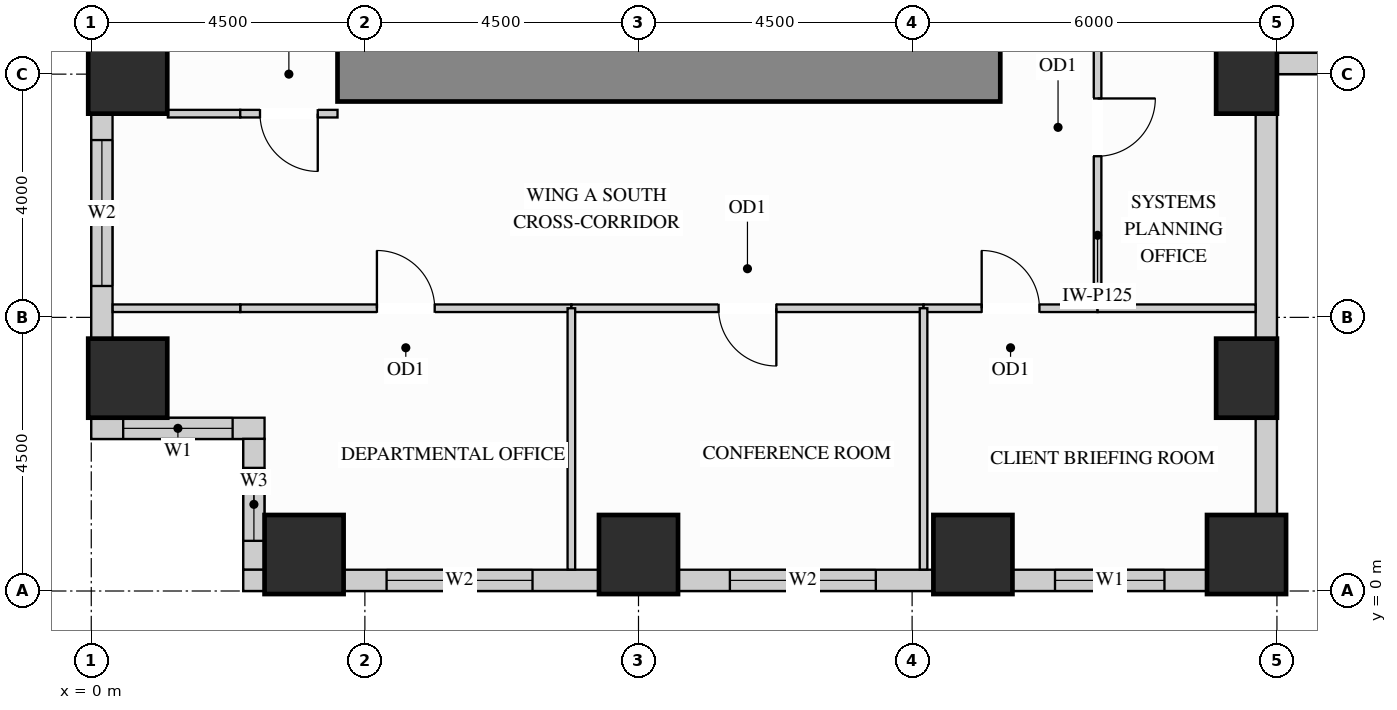
"""IFC4 building model, lengths in metres.
Left out: names, types, materials, properties, quantities, classifications, styles, units other than length and angle.
Written with IfcOpenShell. Run it as: python <this file> out.ifc"""

import sys

from ifc_helpers import new_model, si_unit, direction, frame, frame_2d, origin, origin_2d, place, context, subcontext, project, spatial, rectangle, extrude, source, transform, mapped, element, fill, save


model = new_model("IFC4")
c1 = context("Model", 3, precision=1e-05, world=origin(), true_north=direction((0.0, 1.0)))
c2 = subcontext(c1, "Body", "Model", "MODEL_VIEW")
j1 = project(units=[si_unit("LENGTHUNIT", "METRE"), si_unit("PLANEANGLEUNIT", "RADIAN")], contexts=[c1])
p1 = place(None, origin())
s1 = spatial("IfcSite", under=j1, at=p1, CompositionType="ELEMENT")
p2 = place(p1, origin())
s2 = spatial("IfcBuilding", under=s1, at=p2, CompositionType="ELEMENT")
p3 = place(p2, frame((0.0, 0.0, 65.7)))
s3 = spatial("IfcBuildingStorey", under=s2, at=p3, CompositionType="ELEMENT", Elevation=65.7)
m1 = source(origin(), c2, "Body", "SweptSolid", [
    extrude(rectangle(XDim=1.0, YDim=1.3, at=origin_2d()), origin(), (0.0, 0.0, 1.0), 3.38),
])
for number, where, z_axis, x_axis in (
    (1, (19.0, 3.5, 0.0), (0.0, 0.0, 1.0), (1.0, 0.0, 0.0)),
    (2, (19.0, 8.5, 0.0), (0.0, 0.0, 1.0), (1.0, 0.0, 0.0)),
):
    element("IfcColumn", number, at=place(p3, frame(where, z_axis=z_axis, x_axis=x_axis)), inside=s3, PredefinedType="COLUMN", context=c2, shape_type="MappedRepresentation", body=[
        mapped(m1, transform((0.0, 0.0, 0.0), x_axis=(1.0, 0.0, 0.0), y_axis=(0.0, 1.0, 0.0), z_axis=(0.0, 0.0, 1.0))),
    ])
m2 = source(origin(), c2, "Body", "SweptSolid", [
    extrude(rectangle(XDim=1.3, YDim=1.3, at=origin_2d()), origin(), (0.0, 0.0, 1.0), 3.38),
])
for number, where, z_axis, x_axis in (
    (3, (14.5, 0.6, 0.0), (0.0, 0.0, 1.0), (1.0, 0.0, 0.0)),
    (4, (19.0, 0.6, 0.0), (0.0, 0.0, 1.0), (1.0, 0.0, 0.0)),
    (5, (3.5, 0.6, 0.0), (0.0, 0.0, 1.0), (1.0, 0.0, 0.0)),
    (6, (9.0, 0.6, 0.0), (0.0, 0.0, 1.0), (1.0, 0.0, 0.0)),
    (7, (0.6, 3.5, 0.0), (0.0, 0.0, 1.0), (1.0, 0.0, 0.0)),
    (8, (0.6, 8.5, 0.0), (0.0, 0.0, 1.0), (1.0, 0.0, 0.0)),
):
    element("IfcColumn", number, at=place(p3, frame(where, z_axis=z_axis, x_axis=x_axis)), inside=s3, PredefinedType="COLUMN", context=c2, shape_type="MappedRepresentation", body=[
        mapped(m2, transform((0.0, 0.0, 0.0), x_axis=(1.0, 0.0, 0.0), y_axis=(0.0, 1.0, 0.0), z_axis=(0.0, 0.0, 1.0))),
    ])
m3 = source(origin(), c2, "Body", "SweptSolid", [
    extrude(rectangle(XDim=10.9, YDim=0.9, at=frame_2d((5.45, 0.0))), origin(), (0.0, 0.0, 1.0), 3.38),
])
p4 = place(p3, frame((4.05, 8.5, 0.0), z_axis=(0.0, 0.0, 1.0), x_axis=(1.0, 0.0, 0.0)))
e9 = element("IfcWall", 9, at=p4, inside=s3, PredefinedType="SHEAR", context=c2, shape_type="MappedRepresentation", body=[
    mapped(m3, transform((0.0, 0.0, 0.0), x_axis=(1.0, 0.0, 0.0), y_axis=(0.0, 1.0, 0.0), z_axis=(0.0, 0.0, 1.0))),
])
p5 = place(p3, frame((0.175, 7.852, 0.0), z_axis=(0.0, 0.0, 1.0), x_axis=(0.0, -1.0, 0.0)))
e10 = element("IfcWall", 10, at=p5, inside=s3, PredefinedType="SOLIDWALL", context=c2, shape_type="SweptSolid", body=[
    extrude(rectangle(XDim=3.704, YDim=0.35, at=frame_2d((1.852, 0.0))), origin(), (0.0, 0.0, 1.0), 2.51),
])
p6 = place(p5, frame((0.436, 0.0, 0.78)))
e11 = element("IfcOpeningElement", 11, at=p6, cuts=e10, PredefinedType="OPENING", context=c2, shape_type="SweptSolid", body=[
    extrude(rectangle(XDim=2.4, YDim=1.55, at=frame_2d((1.2, 0.775))), frame((0.0, 0.185, 0.0), z_axis=(0.0, -1.0, 0.0), x_axis=(1.0, 0.0, 0.0)), (0.0, 0.0, 1.0), 0.37),
])
p7 = place(p3, frame((0.0, 2.675, 0.0), z_axis=(0.0, 0.0, 1.0), x_axis=(1.0, 0.0, 0.0)))
e12 = element("IfcWall", 12, at=p7, inside=s3, PredefinedType="SOLIDWALL", context=c2, shape_type="SweptSolid", body=[
    extrude(rectangle(XDim=2.85, YDim=0.35, at=frame_2d((1.425, 0.0))), origin(), (0.0, 0.0, 1.0), 3.365),
])
p8 = place(p7, frame((0.525, 0.0, 0.78)))
e13 = element("IfcOpeningElement", 13, at=p8, cuts=e12, PredefinedType="OPENING", context=c2, shape_type="SweptSolid", body=[
    extrude(rectangle(XDim=1.8, YDim=2.1, at=frame_2d((0.9, 1.05))), frame((0.0, 0.185, 0.0), z_axis=(0.0, -1.0, 0.0), x_axis=(1.0, 0.0, 0.0)), (0.0, 0.0, 1.0), 0.37),
])
p9 = place(p3, frame((2.675, 2.502, 0.0), z_axis=(0.0, 0.0, 1.0), x_axis=(0.0, -1.0, 0.0)))
e14 = element("IfcWall", 14, at=p9, inside=s3, PredefinedType="SOLIDWALL", context=c2, shape_type="SweptSolid", body=[
    extrude(rectangle(XDim=2.154, YDim=0.35, at=frame_2d((1.077, 0.0))), origin(), (0.0, 0.0, 1.0), 3.365),
])
p10 = place(p9, frame((0.477, 0.0, 0.78)))
e15 = element("IfcOpeningElement", 15, at=p10, cuts=e14, PredefinedType="OPENING", context=c2, shape_type="SweptSolid", body=[
    extrude(rectangle(XDim=1.2, YDim=2.1, at=frame_2d((0.6, 1.05))), frame((0.0, 0.185, 0.0), z_axis=(0.0, -1.0, 0.0), x_axis=(1.0, 0.0, 0.0)), (0.0, 0.0, 1.0), 0.37),
])
m4 = source(origin(), c2, "Body", "SweptSolid", [
    extrude(rectangle(XDim=0.352, YDim=0.35, at=frame_2d((0.176, 0.0))), origin(), (0.0, 0.0, 1.0), 3.365),
])
p11 = place(p3, frame((2.5, 0.175, 0.0), z_axis=(0.0, 0.0, 1.0), x_axis=(1.0, 0.0, 0.0)))
e16 = element("IfcWall", 16, at=p11, inside=s3, PredefinedType="SOLIDWALL", context=c2, shape_type="MappedRepresentation", body=[
    mapped(m4, transform((0.0, 0.0, 0.0), x_axis=(1.0, 0.0, 0.0), y_axis=(0.0, 1.0, 0.0), z_axis=(0.0, 0.0, 1.0))),
])
p12 = place(p3, frame((4.148, 0.175, 0.0), z_axis=(0.0, 0.0, 1.0), x_axis=(1.0, 0.0, 0.0)))
e17 = element("IfcWall", 17, at=p12, inside=s3, PredefinedType="SOLIDWALL", context=c2, shape_type="SweptSolid", body=[
    extrude(rectangle(XDim=4.204, YDim=0.35, at=frame_2d((2.102, 0.0))), origin(), (0.0, 0.0, 1.0), 2.51),
])
p13 = place(p12, frame((0.709, 0.0, 0.78)))
e18 = element("IfcOpeningElement", 18, at=p13, cuts=e17, PredefinedType="OPENING", context=c2, shape_type="SweptSolid", body=[
    extrude(rectangle(XDim=2.4, YDim=1.55, at=frame_2d((1.2, 0.775))), frame((0.0, 0.185, 0.0), z_axis=(0.0, -1.0, 0.0), x_axis=(1.0, 0.0, 0.0)), (0.0, 0.0, 1.0), 0.37),
])
p14 = place(p3, frame((9.648, 0.175, 0.0), z_axis=(0.0, 0.0, 1.0), x_axis=(1.0, 0.0, 0.0)))
e19 = element("IfcWall", 19, at=p14, inside=s3, PredefinedType="SOLIDWALL", context=c2, shape_type="SweptSolid", body=[
    extrude(rectangle(XDim=4.204, YDim=0.35, at=frame_2d((2.102, 0.0))), origin(), (0.0, 0.0, 1.0), 2.51),
])
p15 = place(p14, frame((0.855, 0.0, 0.78)))
e20 = element("IfcOpeningElement", 20, at=p15, cuts=e19, PredefinedType="OPENING", context=c2, shape_type="SweptSolid", body=[
    extrude(rectangle(XDim=2.4, YDim=1.55, at=frame_2d((1.2, 0.775))), frame((0.0, 0.185, 0.0), z_axis=(0.0, -1.0, 0.0), x_axis=(1.0, 0.0, 0.0)), (0.0, 0.0, 1.0), 0.37),
])
p16 = place(p3, frame((15.148, 0.175, 0.0), z_axis=(0.0, 0.0, 1.0), x_axis=(1.0, 0.0, 0.0)))
e21 = element("IfcWall", 21, at=p16, inside=s3, PredefinedType="SOLIDWALL", context=c2, shape_type="SweptSolid", body=[
    extrude(rectangle(XDim=3.204, YDim=0.35, at=frame_2d((1.602, 0.0))), origin(), (0.0, 0.0, 1.0), 2.51),
])
p17 = place(p16, frame((0.702, 0.0, 0.78)))
e22 = element("IfcOpeningElement", 22, at=p17, cuts=e21, PredefinedType="OPENING", context=c2, shape_type="SweptSolid", body=[
    extrude(rectangle(XDim=1.8, YDim=1.55, at=frame_2d((0.9, 0.775))), frame((0.0, 0.185, 0.0), z_axis=(0.0, -1.0, 0.0), x_axis=(1.0, 0.0, 0.0)), (0.0, 0.0, 1.0), 0.37),
])
m5 = source(origin(), c2, "Body", "SweptSolid", [
    extrude(rectangle(XDim=1.604, YDim=0.35, at=frame_2d((0.802, 0.0))), origin(), (0.0, 0.0, 1.0), 2.51),
])
p18 = place(p3, frame((19.325, 1.248, 0.0), z_axis=(0.0, 0.0, 1.0), x_axis=(0.0, 1.0, 0.0)))
e23 = element("IfcWall", 23, at=p18, inside=s3, PredefinedType="SOLIDWALL", context=c2, shape_type="MappedRepresentation", body=[
    mapped(m5, transform((0.0, 0.0, 0.0), x_axis=(1.0, 0.0, 0.0), y_axis=(0.0, 1.0, 0.0), z_axis=(0.0, 0.0, 1.0))),
])
m6 = source(origin(), c2, "Body", "SweptSolid", [
    extrude(rectangle(XDim=3.704, YDim=0.35, at=frame_2d((1.852, 0.0))), origin(), (0.0, 0.0, 1.0), 2.51),
])
p19 = place(p3, frame((19.325, 4.148, 0.0), z_axis=(0.0, 0.0, 1.0), x_axis=(0.0, 1.0, 0.0)))
e24 = element("IfcWall", 24, at=p19, inside=s3, PredefinedType="SOLIDWALL", context=c2, shape_type="MappedRepresentation", body=[
    mapped(m6, transform((0.0, 0.0, 0.0), x_axis=(1.0, 0.0, 0.0), y_axis=(0.0, 1.0, 0.0), z_axis=(0.0, 0.0, 1.0))),
])
p20 = place(p3, frame((19.498, 8.675, 0.0), z_axis=(0.0, 0.0, 1.0), x_axis=(1.0, 0.0, 0.0)))
e25 = element("IfcWall", 25, at=p20, inside=s3, PredefinedType="SOLIDWALL", context=c2, shape_type="SweptSolid", body=[
    extrude(rectangle(XDim=3.404, YDim=0.35, at=frame_2d((1.702, 0.0))), origin(), (0.0, 0.0, 1.0), 3.365),
])
p21 = place(p20, frame((0.952, 0.0, 0.78)))
e26 = element("IfcOpeningElement", 26, at=p21, cuts=e25, PredefinedType="OPENING", context=c2, shape_type="SweptSolid", body=[
    extrude(rectangle(XDim=1.5, YDim=2.0, at=frame_2d((0.75, 1.0))), frame((0.0, 0.185, 0.0), z_axis=(0.0, -1.0, 0.0), x_axis=(1.0, 0.0, 0.0)), (0.0, 0.0, 1.0), 0.37),
])
p22 = place(p3, frame((16.55, 4.65, 0.0), z_axis=(0.0, 0.0, 1.0), x_axis=(0.0, 1.0, 0.0)))
e27 = element("IfcWall", 27, at=p22, inside=s3, PredefinedType="PARTITIONING", context=c2, shape_type="SweptSolid", body=[
    extrude(rectangle(XDim=5.95, YDim=0.125, at=frame_2d((2.975, 0.0))), origin(), (0.0, 0.0, 1.0), 3.365),
])
p23 = place(p22, frame((2.5, 0.0, 0.0)))
e28 = element("IfcOpeningElement", 28, at=p23, cuts=e27, PredefinedType="OPENING", context=c2, shape_type="SweptSolid", body=[
    extrude(rectangle(XDim=0.95, YDim=2.15, at=frame_2d((0.475, 1.075))), frame((0.0, 0.073, 0.0), z_axis=(0.0, -1.0, 0.0), x_axis=(1.0, 0.0, 0.0)), (0.0, 0.0, 1.0), 0.145),
])
m7 = source(origin(), c2, "Body", "SweptSolid", [
    extrude(rectangle(XDim=1.19, YDim=0.125, at=frame_2d((0.595, 0.0))), origin(), (0.0, 0.0, 1.0), 3.365),
])
p24 = place(p3, frame((1.26, 7.85, 0.0), z_axis=(0.0, 0.0, 1.0), x_axis=(1.0, 0.0, 0.0)))
e29 = element("IfcWall", 29, at=p24, inside=s3, PredefinedType="PARTITIONING", context=c2, shape_type="MappedRepresentation", body=[
    mapped(m7, transform((0.0, 0.0, 0.0), x_axis=(1.0, 0.0, 0.0), y_axis=(0.0, 1.0, 0.0), z_axis=(0.0, 0.0, 1.0))),
])
p25 = place(p3, frame((2.45, 7.85, 0.0), z_axis=(0.0, 0.0, 1.0), x_axis=(1.0, 0.0, 0.0)))
e30 = element("IfcWall", 30, at=p25, inside=s3, PredefinedType="PARTITIONING", context=c2, shape_type="SweptSolid", body=[
    extrude(rectangle(XDim=1.6, YDim=0.125, at=frame_2d((0.8, 0.0))), origin(), (0.0, 0.0, 1.0), 3.365),
])
p26 = place(p25, frame((0.325, 0.0, 0.0)))
e31 = element("IfcOpeningElement", 31, at=p26, cuts=e30, PredefinedType="OPENING", context=c2, shape_type="SweptSolid", body=[
    extrude(rectangle(XDim=0.95, YDim=2.15, at=frame_2d((0.475, 1.075))), frame((0.0, 0.073, 0.0), z_axis=(0.0, -1.0, 0.0), x_axis=(1.0, 0.0, 0.0)), (0.0, 0.0, 1.0), 0.145),
])
p27 = place(p3, frame((2.45, 4.65, 0.0), z_axis=(0.0, 0.0, 1.0), x_axis=(1.0, 0.0, 0.0)))
e32 = element("IfcWall", 32, at=p27, inside=s3, PredefinedType="PARTITIONING", context=c2, shape_type="SweptSolid", body=[
    extrude(rectangle(XDim=5.446, YDim=0.125, at=frame_2d((2.723, 0.0))), origin(), (0.0, 0.0, 1.0), 2.828),
])
p28 = place(p27, frame((2.248, 0.0, 0.0)))
e33 = element("IfcOpeningElement", 33, at=p28, cuts=e32, PredefinedType="OPENING", context=c2, shape_type="SweptSolid", body=[
    extrude(rectangle(XDim=0.95, YDim=2.15, at=frame_2d((0.475, 1.075))), frame((0.0, 0.073, 0.0), z_axis=(0.0, -1.0, 0.0), x_axis=(1.0, 0.0, 0.0)), (0.0, 0.0, 1.0), 0.145),
])
p29 = place(p3, frame((7.896, 4.65, 0.0), z_axis=(0.0, 0.0, 1.0), x_axis=(1.0, 0.0, 0.0)))
e34 = element("IfcWall", 34, at=p29, inside=s3, PredefinedType="PARTITIONING", context=c2, shape_type="SweptSolid", body=[
    extrude(rectangle(XDim=5.792, YDim=0.125, at=frame_2d((2.896, 0.0))), origin(), (0.0, 0.0, 1.0), 2.828),
])
p30 = place(p29, frame((2.421, 0.0, 0.0)))
e35 = element("IfcOpeningElement", 35, at=p30, cuts=e34, PredefinedType="OPENING", context=c2, shape_type="SweptSolid", body=[
    extrude(rectangle(XDim=0.95, YDim=2.15, at=frame_2d((0.475, 1.075))), frame((0.0, 0.073, 0.0), z_axis=(0.0, -1.0, 0.0), x_axis=(1.0, 0.0, 0.0)), (0.0, 0.0, 1.0), 0.145),
])
p31 = place(p3, frame((13.688, 4.65, 0.0), z_axis=(0.0, 0.0, 1.0), x_axis=(1.0, 0.0, 0.0)))
e36 = element("IfcWall", 36, at=p31, inside=s3, PredefinedType="PARTITIONING", context=c2, shape_type="SweptSolid", body=[
    extrude(rectangle(XDim=2.862, YDim=0.125, at=frame_2d((1.431, 0.0))), origin(), (0.0, 0.0, 1.0), 2.828),
])
p32 = place(p31, frame((0.956, 0.0, 0.0)))
e37 = element("IfcOpeningElement", 37, at=p32, cuts=e36, PredefinedType="OPENING", context=c2, shape_type="SweptSolid", body=[
    extrude(rectangle(XDim=0.95, YDim=2.15, at=frame_2d((0.475, 1.075))), frame((0.0, 0.073, 0.0), z_axis=(0.0, -1.0, 0.0), x_axis=(1.0, 0.0, 0.0)), (0.0, 0.0, 1.0), 0.145),
])
m8 = source(origin(), c2, "Body", "SweptSolid", [
    extrude(rectangle(XDim=2.098, YDim=0.125, at=frame_2d((1.049, 0.0))), origin(), (0.0, 0.0, 1.0), 2.828),
])
p33 = place(p3, frame((0.352, 4.65, 0.0), z_axis=(0.0, 0.0, 1.0), x_axis=(1.0, 0.0, 0.0)))
e38 = element("IfcWall", 38, at=p33, inside=s3, PredefinedType="PARTITIONING", context=c2, shape_type="MappedRepresentation", body=[
    mapped(m8, transform((0.0, 0.0, 0.0), x_axis=(1.0, 0.0, 0.0), y_axis=(0.0, 1.0, 0.0), z_axis=(0.0, 0.0, 1.0))),
])
m9 = source(origin(), c2, "Body", "SweptSolid", [
    extrude(rectangle(XDim=2.598, YDim=0.125, at=frame_2d((1.299, 0.0))), origin(), (0.0, 0.0, 1.0), 2.828),
])
p34 = place(p3, frame((16.55, 4.65, 0.0), z_axis=(0.0, 0.0, 1.0), x_axis=(1.0, 0.0, 0.0)))
e39 = element("IfcWall", 39, at=p34, inside=s3, PredefinedType="PARTITIONING", context=c2, shape_type="MappedRepresentation", body=[
    mapped(m9, transform((0.0, 0.0, 0.0), x_axis=(1.0, 0.0, 0.0), y_axis=(0.0, 1.0, 0.0), z_axis=(0.0, 0.0, 1.0))),
])
m10 = source(origin(), c2, "Body", "SweptSolid", [
    extrude(rectangle(XDim=4.298, YDim=0.125, at=frame_2d((2.149, 0.0))), origin(), (0.0, 0.0, 1.0), 3.365),
])
for number, where, z_axis, x_axis in (
    (40, (7.896, 0.352, 0.0), (0.0, 0.0, 1.0), (0.0, 1.0, 0.0)),
    (41, (13.688, 0.352, 0.0), (0.0, 0.0, 1.0), (0.0, 1.0, 0.0)),
):
    element("IfcWall", number, at=place(p3, frame(where, z_axis=z_axis, x_axis=x_axis)), inside=s3, PredefinedType="PARTITIONING", context=c2, shape_type="MappedRepresentation", body=[
        mapped(m10, transform((0.0, 0.0, 0.0), x_axis=(1.0, 0.0, 0.0), y_axis=(0.0, 1.0, 0.0), z_axis=(0.0, 0.0, 1.0))),
    ])
m11 = source(origin(), c2, "Body", "SweptSolid", [
    extrude(rectangle(XDim=0.95, YDim=2.15, at=frame_2d((0.475, 1.075))), frame((0.0, 0.025, 0.0), z_axis=(0.0, -1.0, 0.0), x_axis=(1.0, 0.0, 0.0)), (0.0, 0.0, 1.0), 0.05),
])
p35 = place(p23, origin())
e42 = element("IfcDoor", 42, at=p35, inside=s3, OperationType="SINGLE_SWING_RIGHT", PredefinedType="DOOR", context=c2, shape_type="MappedRepresentation", body=[
    mapped(m11, transform((0.0, 0.0, 0.0), x_axis=(1.0, 0.0, 0.0), y_axis=(0.0, 1.0, 0.0), z_axis=(0.0, 0.0, 1.0))),
])
fill(e28, e42)
p36 = place(p28, origin())
e43 = element("IfcDoor", 43, at=p36, inside=s3, OperationType="SINGLE_SWING_LEFT", PredefinedType="DOOR", context=c2, shape_type="MappedRepresentation", body=[
    mapped(m11, transform((0.0, 0.0, 0.0), x_axis=(1.0, 0.0, 0.0), y_axis=(0.0, 1.0, 0.0), z_axis=(0.0, 0.0, 1.0))),
])
fill(e33, e43)
p37 = place(p30, origin())
e44 = element("IfcDoor", 44, at=p37, inside=s3, OperationType="SINGLE_SWING_RIGHT", PredefinedType="DOOR", context=c2, shape_type="MappedRepresentation", body=[
    mapped(m11, transform((0.0, 0.0, 0.0), x_axis=(1.0, 0.0, 0.0), y_axis=(0.0, 1.0, 0.0), z_axis=(0.0, 0.0, 1.0))),
])
fill(e35, e44)
p38 = place(p32, origin())
e45 = element("IfcDoor", 45, at=p38, inside=s3, OperationType="SINGLE_SWING_LEFT", PredefinedType="DOOR", context=c2, shape_type="MappedRepresentation", body=[
    mapped(m11, transform((0.0, 0.0, 0.0), x_axis=(1.0, 0.0, 0.0), y_axis=(0.0, 1.0, 0.0), z_axis=(0.0, 0.0, 1.0))),
])
fill(e37, e45)
p39 = place(p26, origin())
e46 = element("IfcDoor", 46, at=p39, inside=s3, OperationType="SINGLE_SWING_RIGHT", PredefinedType="DOOR", context=c2, shape_type="MappedRepresentation", body=[
    mapped(m11, transform((0.0, 0.0, 0.0), x_axis=(1.0, 0.0, 0.0), y_axis=(0.0, 1.0, 0.0), z_axis=(0.0, 0.0, 1.0))),
])
fill(e31, e46)
m12 = source(origin(), c2, "Body", "SweptSolid", [
    extrude(rectangle(XDim=1.8, YDim=2.1, at=frame_2d((0.9, 1.05))), frame((0.0, 0.03, 0.0), z_axis=(0.0, -1.0, 0.0), x_axis=(1.0, 0.0, 0.0)), (0.0, 0.0, 1.0), 0.06),
])
p40 = place(p8, origin())
e47 = element("IfcWindow", 47, at=p40, inside=s3, PartitioningType="SINGLE_PANEL", PredefinedType="WINDOW", context=c2, shape_type="MappedRepresentation", body=[
    mapped(m12, transform((0.0, 0.0, 0.0), x_axis=(1.0, 0.0, 0.0), y_axis=(0.0, 1.0, 0.0), z_axis=(0.0, 0.0, 1.0))),
])
fill(e13, e47)
m13 = source(origin(), c2, "Body", "SweptSolid", [
    extrude(rectangle(XDim=1.8, YDim=1.55, at=frame_2d((0.9, 0.775))), frame((0.0, 0.03, 0.0), z_axis=(0.0, -1.0, 0.0), x_axis=(1.0, 0.0, 0.0)), (0.0, 0.0, 1.0), 0.06),
])
p41 = place(p17, origin())
e48 = element("IfcWindow", 48, at=p41, inside=s3, PartitioningType="SINGLE_PANEL", PredefinedType="WINDOW", context=c2, shape_type="MappedRepresentation", body=[
    mapped(m13, transform((0.0, 0.0, 0.0), x_axis=(1.0, 0.0, 0.0), y_axis=(0.0, 1.0, 0.0), z_axis=(0.0, 0.0, 1.0))),
])
fill(e22, e48)
m14 = source(origin(), c2, "Body", "SweptSolid", [
    extrude(rectangle(XDim=2.4, YDim=1.55, at=frame_2d((1.2, 0.775))), frame((0.0, 0.03, 0.0), z_axis=(0.0, -1.0, 0.0), x_axis=(1.0, 0.0, 0.0)), (0.0, 0.0, 1.0), 0.06),
])
p42 = place(p6, origin())
e49 = element("IfcWindow", 49, at=p42, inside=s3, PartitioningType="SINGLE_PANEL", PredefinedType="WINDOW", context=c2, shape_type="MappedRepresentation", body=[
    mapped(m14, transform((0.0, 0.0, 0.0), x_axis=(1.0, 0.0, 0.0), y_axis=(0.0, 1.0, 0.0), z_axis=(0.0, 0.0, 1.0))),
])
fill(e11, e49)
p43 = place(p13, origin())
e50 = element("IfcWindow", 50, at=p43, inside=s3, PartitioningType="SINGLE_PANEL", PredefinedType="WINDOW", context=c2, shape_type="MappedRepresentation", body=[
    mapped(m14, transform((0.0, 0.0, 0.0), x_axis=(1.0, 0.0, 0.0), y_axis=(0.0, 1.0, 0.0), z_axis=(0.0, 0.0, 1.0))),
])
fill(e18, e50)
p44 = place(p15, origin())
e51 = element("IfcWindow", 51, at=p44, inside=s3, PartitioningType="SINGLE_PANEL", PredefinedType="WINDOW", context=c2, shape_type="MappedRepresentation", body=[
    mapped(m14, transform((0.0, 0.0, 0.0), x_axis=(1.0, 0.0, 0.0), y_axis=(0.0, 1.0, 0.0), z_axis=(0.0, 0.0, 1.0))),
])
fill(e20, e51)
m15 = source(origin(), c2, "Body", "SweptSolid", [
    extrude(rectangle(XDim=1.2, YDim=2.1, at=frame_2d((0.6, 1.05))), frame((0.0, 0.03, 0.0), z_axis=(0.0, -1.0, 0.0), x_axis=(1.0, 0.0, 0.0)), (0.0, 0.0, 1.0), 0.06),
])
p45 = place(p10, origin())
e52 = element("IfcWindow", 52, at=p45, inside=s3, PartitioningType="SINGLE_PANEL", PredefinedType="WINDOW", context=c2, shape_type="MappedRepresentation", body=[
    mapped(m15, transform((0.0, 0.0, 0.0), x_axis=(1.0, 0.0, 0.0), y_axis=(0.0, 1.0, 0.0), z_axis=(0.0, 0.0, 1.0))),
])
fill(e15, e52)
save(model, sys.argv[1])
